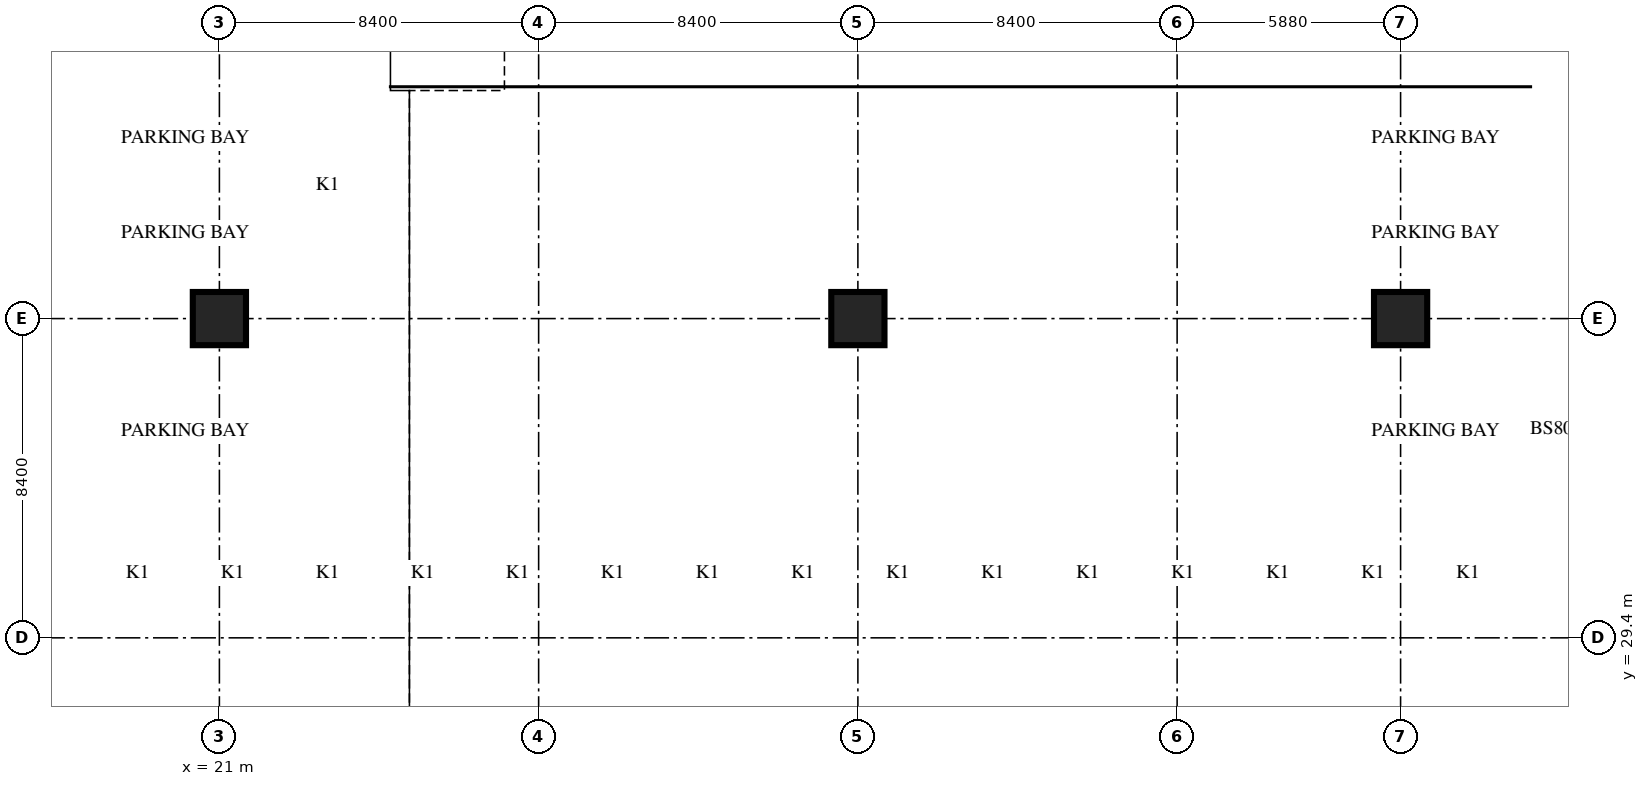
"""IFC4 building model, lengths in metres.
Left out: names, types, materials, properties, quantities, classifications, styles, units other than length and angle.
Written with IfcOpenShell. Run it as: python <this file> out.ifc"""

import sys

from ifc_helpers import new_model, si_unit, direction, frame, origin, origin_2d, place, context, subcontext, project, spatial, rectangle, extrude, source, transform, mapped, element, save


model = new_model("IFC4")
c1 = context("Model", 3, precision=1e-05, world=origin(), true_north=direction((0.0, 1.0)))
c2 = subcontext(c1, "Body", "Model", "MODEL_VIEW")
j1 = project(units=[si_unit("LENGTHUNIT", "METRE"), si_unit("PLANEANGLEUNIT", "RADIAN")], contexts=[c1])
p1 = place(None, origin())
s1 = spatial("IfcSite", under=j1, at=p1, CompositionType="ELEMENT")
p2 = place(p1, origin())
s2 = spatial("IfcBuilding", under=s1, at=p2, CompositionType="ELEMENT")
p3 = place(p2, frame((0.0, 0.0, -13.5)))
s3 = spatial("IfcBuildingStorey", under=s2, at=p3, CompositionType="ELEMENT", Elevation=-13.5)
m1 = source(origin(), c2, "Body", "SweptSolid", [
    extrude(rectangle(XDim=1.4, YDim=1.4, at=origin_2d()), origin(), (0.0, 0.0, 1.0), 4.5),
])
for number, where, z_axis, x_axis in (
    (1, (21.0, 37.8, 0.0), (0.0, 0.0, 1.0), (1.0, 0.0, 0.0)),
    (2, (37.8, 37.8, 0.0), (0.0, 0.0, 1.0), (1.0, 0.0, 0.0)),
    (3, (52.08, 37.8, 0.0), (0.0, 0.0, 1.0), (1.0, 0.0, 0.0)),
):
    element("IfcColumn", number, at=place(p3, frame(where, z_axis=z_axis, x_axis=x_axis)), inside=s3, PredefinedType="COLUMN", context=c2, shape_type="MappedRepresentation", body=[
        mapped(m1, transform((0.0, 0.0, 0.0), scale=1.0)),
    ])
save(model, sys.argv[1])
